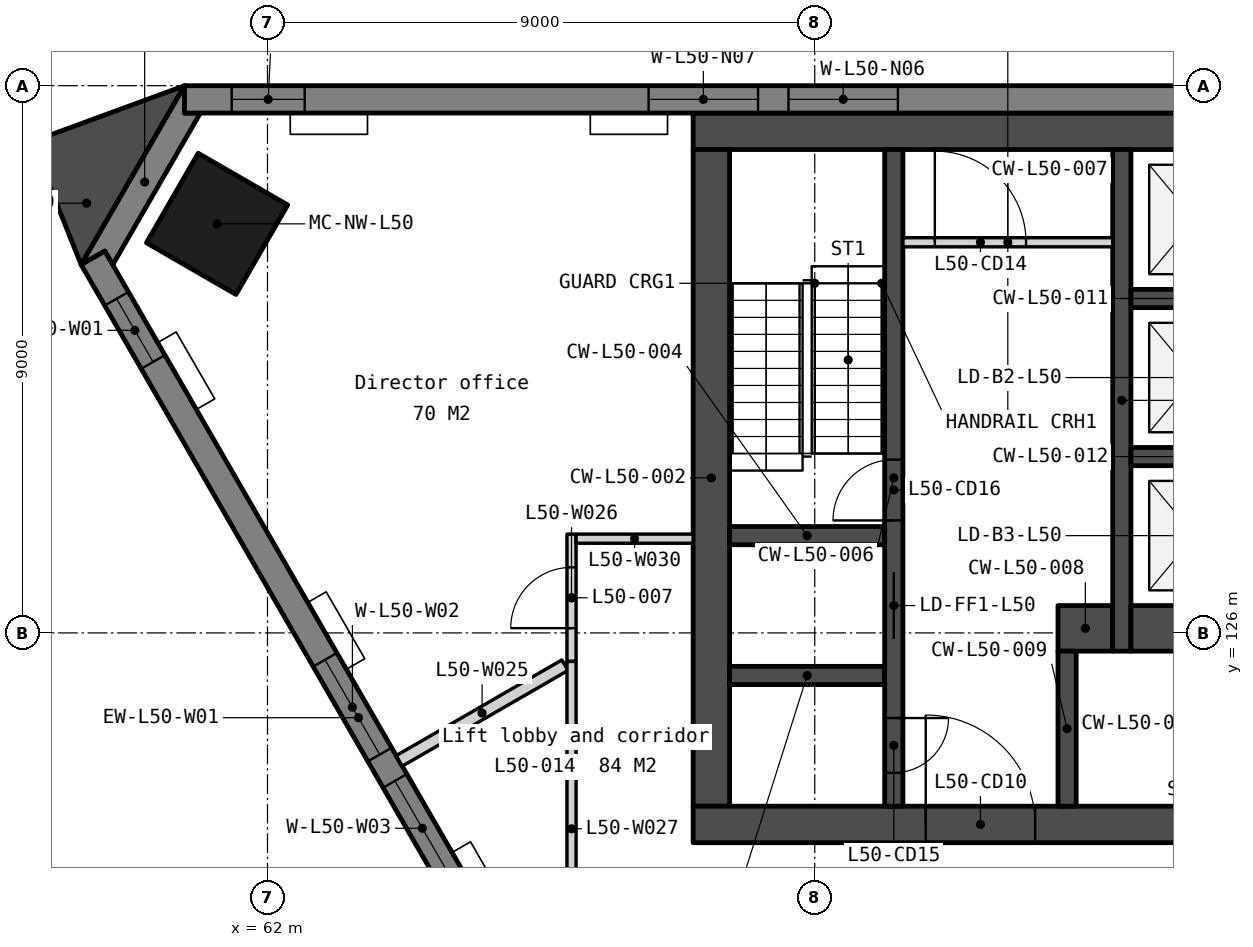
"""IFC4 building model, lengths in metres.
Left out: names, types, materials, properties, quantities, classifications, styles, units other than length and angle.
Written with IfcOpenShell. Run it as: python <this file> out.ifc"""

import sys

from ifc_helpers import new_model, si_unit, direction, frame, frame_2d, origin, origin_2d, place, context, subcontext, project, spatial, polyline, rectangle, outline, extrude, element, fill, save


model = new_model("IFC4")
c1 = context("Model", 3, precision=1e-05, world=origin(), true_north=direction((0.0, 1.0)))
c2 = subcontext(c1, "Body", "Model", "MODEL_VIEW")
j1 = project(units=[si_unit("LENGTHUNIT", "METRE"), si_unit("PLANEANGLEUNIT", "RADIAN")], contexts=[c1])
p1 = place(None, origin())
s1 = spatial("IfcSite", under=j1, at=p1, CompositionType="ELEMENT")
p2 = place(p1, origin())
s2 = spatial("IfcBuilding", under=s1, at=p2, CompositionType="ELEMENT")
p3 = place(p2, frame((0.0, 0.0, 199.7)))
s3 = spatial("IfcBuildingStorey", under=s2, at=p3, CompositionType="ELEMENT", Elevation=199.7)
p4 = place(p3, frame((61.171, 132.728, 0.0), z_axis=(0.0, 0.0, 1.0), x_axis=(-0.5, -0.866025403784, 0.0)))
e1 = element("IfcColumn", 1, at=p4, inside=s3, PredefinedType="COLUMN", context=c2, shape_type="SweptSolid", body=[
    extrude(rectangle(XDim=1.7, YDim=1.7, at=origin_2d()), origin(), (0.0, 0.0, 1.0), 3.9),
])
p5 = place(p3, frame((69.0, 134.25, 0.0), z_axis=(0.0, 0.0, 1.0), x_axis=(1.0, 0.0, 0.0)))
e2 = element("IfcWall", 2, at=p5, inside=s3, PredefinedType="SOLIDWALL", context=c2, shape_type="SweptSolid", body=[
    extrude(rectangle(XDim=22.0, YDim=0.6, at=frame_2d((11.0, 0.0))), origin(), (0.0, 0.0, 1.0), 3.75),
])
p6 = place(p3, frame((69.3, 133.95, 0.0), z_axis=(0.0, 0.0, 1.0), x_axis=(0.0, -1.0, 0.0)))
e3 = element("IfcWall", 3, at=p6, inside=s3, PredefinedType="SOLIDWALL", context=c2, shape_type="SweptSolid", body=[
    extrude(rectangle(XDim=10.8, YDim=0.6, at=frame_2d((5.4, 0.0))), origin(), (0.0, 0.0, 1.0), 3.75),
])
p7 = place(p3, frame((69.0, 122.85, 0.0), z_axis=(0.0, 0.0, 1.0), x_axis=(1.0, 0.0, 0.0)))
e4 = element("IfcWall", 4, at=p7, inside=s3, PredefinedType="SOLIDWALL", context=c2, shape_type="SweptSolid", body=[
    extrude(rectangle(XDim=22.0, YDim=0.6, at=frame_2d((11.0, 0.0))), origin(), (0.0, 0.0, 1.0), 3.75),
])
p8 = place(p7, frame((16.375, 0.0, 0.0)))
e5 = element("IfcOpeningElement", 5, at=p8, cuts=e4, PredefinedType="OPENING", context=c2, shape_type="SweptSolid", body=[
    extrude(rectangle(XDim=1.8, YDim=2.1, at=frame_2d((0.9, 1.05))), frame((0.0, 0.31, 0.0), z_axis=(0.0, -1.0, 0.0), x_axis=(1.0, 0.0, 0.0)), (0.0, 0.0, 1.0), 0.62),
])
p9 = place(p7, frame((3.825, 0.0, 0.0)))
e6 = element("IfcOpeningElement", 6, at=p9, cuts=e4, PredefinedType="OPENING", context=c2, shape_type="SweptSolid", body=[
    extrude(rectangle(XDim=1.8, YDim=2.1, at=frame_2d((0.9, 1.05))), frame((0.0, 0.31, 0.0), z_axis=(0.0, -1.0, 0.0), x_axis=(1.0, 0.0, 0.0)), (0.0, 0.0, 1.0), 0.62),
])
p10 = place(p7, frame((12.85, 0.0, 0.0)))
e7 = element("IfcOpeningElement", 7, at=p10, cuts=e4, PredefinedType="OPENING", context=c2, shape_type="SweptSolid", body=[
    extrude(rectangle(XDim=1.5, YDim=2.1, at=frame_2d((0.75, 1.05))), frame((0.0, 0.31, 0.0), z_axis=(0.0, -1.0, 0.0), x_axis=(1.0, 0.0, 0.0)), (0.0, 0.0, 1.0), 0.62),
])
for number, where, z_axis, x_axis in (
    (8, (69.6, 127.6, 0.0), (0.0, 0.0, 1.0), (1.0, 0.0, 0.0)),
    (9, (69.6, 125.3, 0.0), (0.0, 0.0, 1.0), (1.0, 0.0, 0.0)),
):
    element("IfcWall", number, at=place(p3, frame(where, z_axis=z_axis, x_axis=x_axis)), inside=s3, PredefinedType="SOLIDWALL", context=c2, shape_type="SweptSolid", body=[
        extrude(rectangle(XDim=2.55, YDim=0.3, at=frame_2d((1.275, 0.0))), origin(), (0.0, 0.0, 1.0), 3.75),
    ])
p11 = place(p3, frame((72.3, 133.95, 0.0), z_axis=(0.0, 0.0, 1.0), x_axis=(0.0, -1.0, 0.0)))
e10 = element("IfcWall", 10, at=p11, inside=s3, PredefinedType="SOLIDWALL", context=c2, shape_type="SweptSolid", body=[
    extrude(rectangle(XDim=10.8, YDim=0.3, at=frame_2d((5.4, 0.0))), origin(), (0.0, 0.0, 1.0), 3.75),
])
p12 = place(p11, frame((6.95, 0.0, 0.0)))
e11 = element("IfcOpeningElement", 11, at=p12, cuts=e10, PredefinedType="OPENING", context=c2, shape_type="SweptSolid", body=[
    extrude(rectangle(XDim=1.1, YDim=2.1, at=frame_2d((0.55, 1.05))), frame((0.0, 0.16, 0.0), z_axis=(0.0, -1.0, 0.0), x_axis=(1.0, 0.0, 0.0)), (0.0, 0.0, 1.0), 0.32),
])
p13 = place(p11, frame((9.35, 0.0, 0.0)))
e12 = element("IfcOpeningElement", 12, at=p13, cuts=e10, PredefinedType="OPENING", context=c2, shape_type="SweptSolid", body=[
    extrude(rectangle(XDim=0.9, YDim=2.1, at=frame_2d((0.45, 1.05))), frame((0.0, 0.16, 0.0), z_axis=(0.0, -1.0, 0.0), x_axis=(1.0, 0.0, 0.0)), (0.0, 0.0, 1.0), 0.32),
])
p14 = place(p11, frame((5.1, 0.0, 0.0)))
e13 = element("IfcOpeningElement", 13, at=p14, cuts=e10, PredefinedType="OPENING", context=c2, shape_type="SweptSolid", body=[
    extrude(rectangle(XDim=1.0, YDim=2.1, at=frame_2d((0.5, 1.05))), frame((0.0, 0.16, 0.0), z_axis=(0.0, -1.0, 0.0), x_axis=(1.0, 0.0, 0.0)), (0.0, 0.0, 1.0), 0.32),
])
p15 = place(p3, frame((72.45, 132.425, 0.0), z_axis=(0.0, 0.0, 1.0), x_axis=(1.0, 0.0, 0.0)))
e14 = element("IfcWall", 14, at=p15, inside=s3, PredefinedType="PARTITIONING", context=c2, shape_type="SweptSolid", body=[
    extrude(rectangle(XDim=3.45, YDim=0.15, at=frame_2d((1.725, 0.0))), origin(), (0.0, 0.0, 1.0), 3.75),
])
p16 = place(p15, frame((0.525, 0.0, 0.0)))
e15 = element("IfcOpeningElement", 15, at=p16, cuts=e14, PredefinedType="OPENING", context=c2, shape_type="SweptSolid", body=[
    extrude(rectangle(XDim=1.5, YDim=2.1, at=frame_2d((0.75, 1.05))), frame((0.0, 0.085, 0.0), z_axis=(0.0, -1.0, 0.0), x_axis=(1.0, 0.0, 0.0)), (0.0, 0.0, 1.0), 0.17),
])
p17 = place(p3, frame((75.0, 126.075, 0.0), z_axis=(0.0, 0.0, 1.0), x_axis=(1.0, 0.0, 0.0)))
e16 = element("IfcWall", 16, at=p17, inside=s3, PredefinedType="SOLIDWALL", context=c2, shape_type="SweptSolid", body=[
    extrude(rectangle(XDim=0.9, YDim=0.75, at=frame_2d((0.45, 0.0))), origin(), (0.0, 0.0, 1.0), 3.75),
])
p18 = place(p3, frame((75.15, 125.7, 0.0), z_axis=(0.0, 0.0, 1.0), x_axis=(0.0, -1.0, 0.0)))
e17 = element("IfcWall", 17, at=p18, inside=s3, PredefinedType="SOLIDWALL", context=c2, shape_type="SweptSolid", body=[
    extrude(rectangle(XDim=2.55, YDim=0.3, at=frame_2d((1.275, 0.0))), origin(), (0.0, 0.0, 1.0), 3.75),
])
p19 = place(p3, frame((76.05, 133.95, 0.0), z_axis=(0.0, 0.0, 1.0), x_axis=(0.0, -1.0, 0.0)))
e18 = element("IfcWall", 18, at=p19, inside=s3, PredefinedType="SOLIDWALL", context=c2, shape_type="SweptSolid", body=[
    extrude(rectangle(XDim=8.25, YDim=0.3, at=frame_2d((4.125, 0.0))), origin(), (0.0, 0.0, 1.0), 3.75),
])
for number, where, z_axis, x_axis in (
    (19, (76.2, 131.5, 0.0), (0.0, 0.0, 1.0), (1.0, 0.0, 0.0)),
    (20, (76.2, 128.9, 0.0), (0.0, 0.0, 1.0), (1.0, 0.0, 0.0)),
):
    element("IfcWall", number, at=place(p3, frame(where, z_axis=z_axis, x_axis=x_axis)), inside=s3, PredefinedType="SOLIDWALL", context=c2, shape_type="SweptSolid", body=[
        extrude(rectangle(XDim=2.1, YDim=0.3, at=frame_2d((1.05, 0.0))), origin(), (0.0, 0.0, 1.0), 3.75),
    ])
p20 = place(p3, frame((76.2, 126.075, 0.0), z_axis=(0.0, 0.0, 1.0), x_axis=(1.0, 0.0, 0.0)))
e21 = element("IfcWall", 21, at=p20, inside=s3, PredefinedType="SOLIDWALL", context=c2, shape_type="SweptSolid", body=[
    extrude(rectangle(XDim=2.1, YDim=0.75, at=frame_2d((1.05, 0.0))), origin(), (0.0, 0.0, 1.0), 3.75),
])
p21 = place(p3, frame((0.0, 0.0, -0.15)))
e22 = element("IfcWall", 22, at=p21, inside=s3, PredefinedType="SOLIDWALL", context=c2, shape_type="SweptSolid", body=[
    extrude(outline(polyline([(60.635, 135.0), (60.635, 134.55), (60.895, 134.55), (59.455, 132.055), (59.325, 132.281), (58.935, 132.055), (60.635, 135.0)])), origin(), (0.0, 0.0, 1.0), 3.9),
])
p22 = place(p3, frame((99.365, 134.775, -0.15), z_axis=(0.0, 0.0, 1.0), x_axis=(-1.0, 0.0, 0.0)))
e23 = element("IfcWall", 23, at=p22, inside=s3, PredefinedType="SOLIDWALL", context=c2, shape_type="SweptSolid", body=[
    extrude(outline(polyline([(38.729, 0.0), (38.729, 3.9), (0.0, 3.9), (0.0, 0.0), (38.729, 0.0)])), frame((0.0, 0.225, 0.0), z_axis=(0.0, -1.0, 0.0), x_axis=(1.0, 0.0, 0.0)), (0.0, 0.0, 1.0), 0.45),
])
p23 = place(p22, frame((0.776, 0.0, 0.95)))
e24 = element("IfcOpeningElement", 24, at=p23, cuts=e23, PredefinedType="OPENING", context=c2, shape_type="SweptSolid", body=[
    extrude(rectangle(XDim=1.2, YDim=2.2, at=frame_2d((0.6, 1.1))), frame((0.0, 0.235, 0.0), z_axis=(0.0, -1.0, 0.0), x_axis=(1.0, 0.0, 0.0)), (0.0, 0.0, 1.0), 0.47),
])
p24 = place(p22, frame((7.632, 0.0, 0.95)))
e25 = element("IfcOpeningElement", 25, at=p24, cuts=e23, PredefinedType="OPENING", context=c2, shape_type="SweptSolid", body=[
    extrude(rectangle(XDim=1.8, YDim=2.2, at=frame_2d((0.9, 1.1))), frame((0.0, 0.235, 0.0), z_axis=(0.0, -1.0, 0.0), x_axis=(1.0, 0.0, 0.0)), (0.0, 0.0, 1.0), 0.47),
])
p25 = place(p22, frame((9.932, 0.0, 0.95)))
e26 = element("IfcOpeningElement", 26, at=p25, cuts=e23, PredefinedType="OPENING", context=c2, shape_type="SweptSolid", body=[
    extrude(rectangle(XDim=1.8, YDim=2.2, at=frame_2d((0.9, 1.1))), frame((0.0, 0.235, 0.0), z_axis=(0.0, -1.0, 0.0), x_axis=(1.0, 0.0, 0.0)), (0.0, 0.0, 1.0), 0.47),
])
p26 = place(p22, frame((17.315, 0.0, 0.95)))
e27 = element("IfcOpeningElement", 27, at=p26, cuts=e23, PredefinedType="OPENING", context=c2, shape_type="SweptSolid", body=[
    extrude(rectangle(XDim=1.8, YDim=2.2, at=frame_2d((0.9, 1.1))), frame((0.0, 0.235, 0.0), z_axis=(0.0, -1.0, 0.0), x_axis=(1.0, 0.0, 0.0)), (0.0, 0.0, 1.0), 0.47),
])
p27 = place(p22, frame((19.615, 0.0, 0.95)))
e28 = element("IfcOpeningElement", 28, at=p27, cuts=e23, PredefinedType="OPENING", context=c2, shape_type="SweptSolid", body=[
    extrude(rectangle(XDim=1.8, YDim=2.2, at=frame_2d((0.9, 1.1))), frame((0.0, 0.235, 0.0), z_axis=(0.0, -1.0, 0.0), x_axis=(1.0, 0.0, 0.0)), (0.0, 0.0, 1.0), 0.47),
])
p28 = place(p22, frame((26.997, 0.0, 0.95)))
e29 = element("IfcOpeningElement", 29, at=p28, cuts=e23, PredefinedType="OPENING", context=c2, shape_type="SweptSolid", body=[
    extrude(rectangle(XDim=1.8, YDim=2.2, at=frame_2d((0.9, 1.1))), frame((0.0, 0.235, 0.0), z_axis=(0.0, -1.0, 0.0), x_axis=(1.0, 0.0, 0.0)), (0.0, 0.0, 1.0), 0.47),
])
p29 = place(p22, frame((29.297, 0.0, 0.95)))
e30 = element("IfcOpeningElement", 30, at=p29, cuts=e23, PredefinedType="OPENING", context=c2, shape_type="SweptSolid", body=[
    extrude(rectangle(XDim=1.8, YDim=2.2, at=frame_2d((0.9, 1.1))), frame((0.0, 0.235, 0.0), z_axis=(0.0, -1.0, 0.0), x_axis=(1.0, 0.0, 0.0)), (0.0, 0.0, 1.0), 0.47),
])
p30 = place(p22, frame((36.753, 0.0, 0.95)))
e31 = element("IfcOpeningElement", 31, at=p30, cuts=e23, PredefinedType="OPENING", context=c2, shape_type="SweptSolid", body=[
    extrude(rectangle(XDim=1.2, YDim=2.2, at=frame_2d((0.6, 1.1))), frame((0.0, 0.235, 0.0), z_axis=(0.0, -1.0, 0.0), x_axis=(1.0, 0.0, 0.0)), (0.0, 0.0, 1.0), 0.47),
])
p31 = place(p3, frame((59.13, 132.168, -0.15), z_axis=(0.0, 0.0, 1.0), x_axis=(0.500006012489, -0.866021932445, 0.0)))
e32 = element("IfcWall", 32, at=p31, inside=s3, PredefinedType="SOLIDWALL", context=c2, shape_type="SweptSolid", body=[
    extrude(outline(polyline([(0.0, 0.0), (0.0, 3.9), (17.465, 3.9), (17.465, 0.0), (0.0, 0.0)])), frame((0.0, 0.225, 0.0), z_axis=(0.0, -1.0, 0.0), x_axis=(1.0, 0.0, 0.0)), (0.0, 0.0, 1.0), 0.45),
])
p32 = place(p31, frame((0.776, 0.0, 0.95)))
e33 = element("IfcOpeningElement", 33, at=p32, cuts=e32, PredefinedType="OPENING", context=c2, shape_type="SweptSolid", body=[
    extrude(rectangle(XDim=1.2, YDim=2.2, at=frame_2d((0.6, 1.1))), frame((0.0, 0.235, 0.0), z_axis=(0.0, -1.0, 0.0), x_axis=(1.0, 0.0, 0.0)), (0.0, 0.0, 1.0), 0.47),
])
p33 = place(p31, frame((7.632, 0.0, 0.95)))
e34 = element("IfcOpeningElement", 34, at=p33, cuts=e32, PredefinedType="OPENING", context=c2, shape_type="SweptSolid", body=[
    extrude(rectangle(XDim=1.8, YDim=2.2, at=frame_2d((0.9, 1.1))), frame((0.0, 0.235, 0.0), z_axis=(0.0, -1.0, 0.0), x_axis=(1.0, 0.0, 0.0)), (0.0, 0.0, 1.0), 0.47),
])
p34 = place(p31, frame((9.932, 0.0, 0.95)))
e35 = element("IfcOpeningElement", 35, at=p34, cuts=e32, PredefinedType="OPENING", context=c2, shape_type="SweptSolid", body=[
    extrude(rectangle(XDim=1.8, YDim=2.2, at=frame_2d((0.9, 1.1))), frame((0.0, 0.235, 0.0), z_axis=(0.0, -1.0, 0.0), x_axis=(1.0, 0.0, 0.0)), (0.0, 0.0, 1.0), 0.47),
])
p35 = place(p3, frame((0.0, 0.0, -0.15)))
e36 = element("IfcWall", 36, at=p35, inside=s3, PredefinedType="SOLIDWALL", context=c2, shape_type="SweptSolid", body=[
    extrude(outline(polyline([(60.635, 135.0), (58.126, 134.079), (58.935, 132.055), (60.635, 135.0)])), origin(), (0.0, 0.0, 1.0), 3.9),
])
p36 = place(p3, frame((64.166, 123.896, 0.0), z_axis=(0.0, 0.0, 1.0), x_axis=(0.866024095498, 0.500002266011, 0.0)))
e37 = element("IfcWall", 37, at=p36, inside=s3, PredefinedType="PARTITIONING", context=c2, shape_type="SweptSolid", body=[
    extrude(rectangle(XDim=3.147, YDim=0.2, at=frame_2d((1.573, 0.0))), origin(), (0.0, 0.0, 1.0), 3.75),
])
p37 = place(p3, frame((67.0, 125.531, 0.0), z_axis=(0.0, 0.0, 1.0), x_axis=(0.0, 1.0, 0.0)))
e38 = element("IfcWall", 38, at=p37, inside=s3, PredefinedType="PARTITIONING", context=c2, shape_type="SweptSolid", body=[
    extrude(rectangle(XDim=2.094, YDim=0.15, at=frame_2d((1.047, 0.0))), origin(), (0.0, 0.0, 1.0), 3.75),
])
p38 = place(p37, frame((0.547, 0.0, 0.0)))
e39 = element("IfcOpeningElement", 39, at=p38, cuts=e38, PredefinedType="OPENING", context=c2, shape_type="SweptSolid", body=[
    extrude(rectangle(XDim=1.0, YDim=2.1, at=frame_2d((0.5, 1.05))), frame((0.0, 0.085, 0.0), z_axis=(0.0, -1.0, 0.0), x_axis=(1.0, 0.0, 0.0)), (0.0, 0.0, 1.0), 0.17),
])
p39 = place(p3, frame((67.0, 120.025, 0.0), z_axis=(0.0, 0.0, 1.0), x_axis=(0.0, 1.0, 0.0)))
e40 = element("IfcWall", 40, at=p39, inside=s3, PredefinedType="PARTITIONING", context=c2, shape_type="SweptSolid", body=[
    extrude(rectangle(XDim=5.507, YDim=0.15, at=frame_2d((2.753, 0.0))), origin(), (0.0, 0.0, 1.0), 3.75),
])
p40 = place(p3, frame((67.075, 127.55, 0.0), z_axis=(0.0, 0.0, 1.0), x_axis=(1.0, 0.0, 0.0)))
e41 = element("IfcWall", 41, at=p40, inside=s3, PredefinedType="PARTITIONING", context=c2, shape_type="SweptSolid", body=[
    extrude(rectangle(XDim=1.925, YDim=0.15, at=frame_2d((0.962, 0.0))), origin(), (0.0, 0.0, 1.0), 3.75),
])
p41 = place(p12, origin())
e42 = element("IfcDoor", 42, at=p41, inside=s3, OperationType="SLIDING_TO_LEFT", PredefinedType="DOOR", context=c2, shape_type="SweptSolid", body=[
    extrude(rectangle(XDim=1.1, YDim=2.1, at=frame_2d((0.55, 1.05))), frame((0.0, 0.025, 0.0), z_axis=(0.0, -1.0, 0.0), x_axis=(1.0, 0.0, 0.0)), (0.0, 0.0, 1.0), 0.05),
])
fill(e11, e42)
p42 = place(p9, origin())
e43 = element("IfcDoor", 43, at=p42, inside=s3, OperationType="DOUBLE_DOOR_DOUBLE_SWING", PredefinedType="DOOR", context=c2, shape_type="SweptSolid", body=[
    extrude(rectangle(XDim=1.8, YDim=2.1, at=frame_2d((0.9, 1.05))), frame((0.0, 0.025, 0.0), z_axis=(0.0, -1.0, 0.0), x_axis=(1.0, 0.0, 0.0)), (0.0, 0.0, 1.0), 0.05),
])
fill(e6, e43)
p43 = place(p16, origin())
e44 = element("IfcDoor", 44, at=p43, inside=s3, OperationType="DOUBLE_DOOR_DOUBLE_SWING", PredefinedType="DOOR", context=c2, shape_type="SweptSolid", body=[
    extrude(rectangle(XDim=1.5, YDim=2.1, at=frame_2d((0.75, 1.05))), frame((0.0, 0.025, 0.0), z_axis=(0.0, -1.0, 0.0), x_axis=(1.0, 0.0, 0.0)), (0.0, 0.0, 1.0), 0.05),
])
fill(e15, e44)
p44 = place(p13, origin())
e45 = element("IfcDoor", 45, at=p44, inside=s3, OperationType="SINGLE_SWING_LEFT", PredefinedType="DOOR", context=c2, shape_type="SweptSolid", body=[
    extrude(rectangle(XDim=0.9, YDim=2.1, at=frame_2d((0.45, 1.05))), frame((0.0, 0.025, 0.0), z_axis=(0.0, -1.0, 0.0), x_axis=(1.0, 0.0, 0.0)), (0.0, 0.0, 1.0), 0.05),
])
fill(e12, e45)
p45 = place(p14, origin())
e46 = element("IfcDoor", 46, at=p45, inside=s3, OperationType="SINGLE_SWING_RIGHT", PredefinedType="DOOR", context=c2, shape_type="SweptSolid", body=[
    extrude(rectangle(XDim=1.0, YDim=2.1, at=frame_2d((0.5, 1.05))), frame((0.0, 0.025, 0.0), z_axis=(0.0, -1.0, 0.0), x_axis=(1.0, 0.0, 0.0)), (0.0, 0.0, 1.0), 0.05),
])
fill(e13, e46)
p46 = place(p28, origin())
e47 = element("IfcWindow", 47, at=p46, inside=s3, PartitioningType="SINGLE_PANEL", PredefinedType="WINDOW", context=c2, shape_type="SweptSolid", body=[
    extrude(rectangle(XDim=1.8, YDim=2.2, at=frame_2d((0.9, 1.1))), frame((0.0, 0.03, 0.0), z_axis=(0.0, -1.0, 0.0), x_axis=(1.0, 0.0, 0.0)), (0.0, 0.0, 1.0), 0.06),
])
fill(e29, e47)
p47 = place(p29, origin())
e48 = element("IfcWindow", 48, at=p47, inside=s3, PartitioningType="SINGLE_PANEL", PredefinedType="WINDOW", context=c2, shape_type="SweptSolid", body=[
    extrude(rectangle(XDim=1.8, YDim=2.2, at=frame_2d((0.9, 1.1))), frame((0.0, 0.03, 0.0), z_axis=(0.0, -1.0, 0.0), x_axis=(1.0, 0.0, 0.0)), (0.0, 0.0, 1.0), 0.06),
])
fill(e30, e48)
p48 = place(p30, origin())
e49 = element("IfcWindow", 49, at=p48, inside=s3, PartitioningType="SINGLE_PANEL", PredefinedType="WINDOW", context=c2, shape_type="SweptSolid", body=[
    extrude(rectangle(XDim=1.2, YDim=2.2, at=frame_2d((0.6, 1.1))), frame((0.0, 0.03, 0.0), z_axis=(0.0, -1.0, 0.0), x_axis=(1.0, 0.0, 0.0)), (0.0, 0.0, 1.0), 0.06),
])
fill(e31, e49)
p49 = place(p32, origin())
e50 = element("IfcWindow", 50, at=p49, inside=s3, PartitioningType="SINGLE_PANEL", PredefinedType="WINDOW", context=c2, shape_type="SweptSolid", body=[
    extrude(rectangle(XDim=1.2, YDim=2.2, at=frame_2d((0.6, 1.1))), frame((0.0, 0.03, 0.0), z_axis=(0.0, -1.0, 0.0), x_axis=(1.0, 0.0, 0.0)), (0.0, 0.0, 1.0), 0.06),
])
fill(e33, e50)
p50 = place(p33, origin())
e51 = element("IfcWindow", 51, at=p50, inside=s3, PartitioningType="SINGLE_PANEL", PredefinedType="WINDOW", context=c2, shape_type="SweptSolid", body=[
    extrude(rectangle(XDim=1.8, YDim=2.2, at=frame_2d((0.9, 1.1))), frame((0.0, 0.03, 0.0), z_axis=(0.0, -1.0, 0.0), x_axis=(1.0, 0.0, 0.0)), (0.0, 0.0, 1.0), 0.06),
])
fill(e34, e51)
p51 = place(p34, origin())
e52 = element("IfcWindow", 52, at=p51, inside=s3, PartitioningType="SINGLE_PANEL", PredefinedType="WINDOW", context=c2, shape_type="SweptSolid", body=[
    extrude(rectangle(XDim=1.8, YDim=2.2, at=frame_2d((0.9, 1.1))), frame((0.0, 0.03, 0.0), z_axis=(0.0, -1.0, 0.0), x_axis=(1.0, 0.0, 0.0)), (0.0, 0.0, 1.0), 0.06),
])
fill(e35, e52)
p52 = place(p38, origin())
e53 = element("IfcDoor", 53, at=p52, inside=s3, OperationType="SINGLE_SWING_LEFT", PredefinedType="DOOR", context=c2, shape_type="SweptSolid", body=[
    extrude(rectangle(XDim=1.0, YDim=2.1, at=frame_2d((0.5, 1.05))), frame((0.0, 0.025, 0.0), z_axis=(0.0, -1.0, 0.0), x_axis=(1.0, 0.0, 0.0)), (0.0, 0.0, 1.0), 0.05),
])
fill(e39, e53)
save(model, sys.argv[1])
